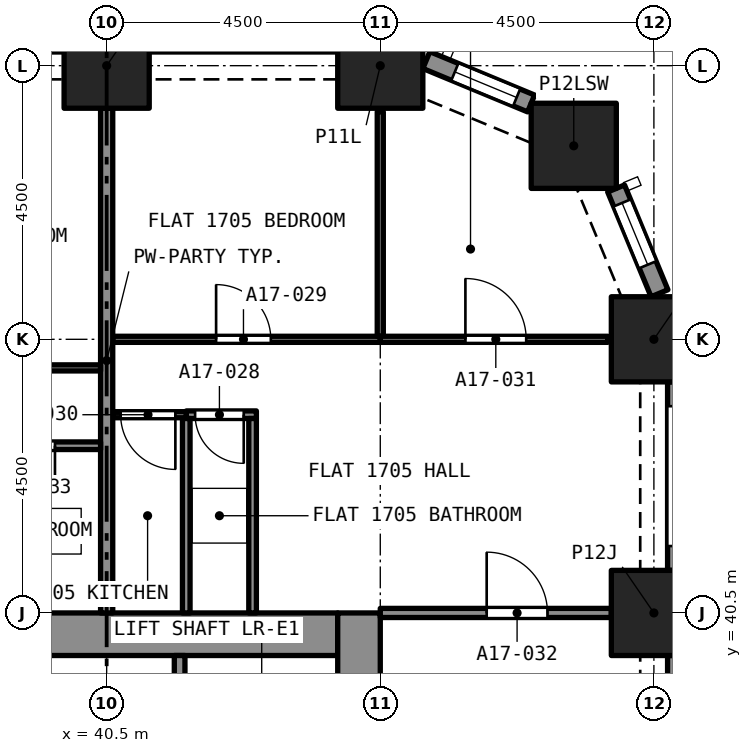
"""IFC4 building model, lengths in metres.
Left out: names, types, materials, properties, quantities, classifications, styles, units other than length and angle.
Written with IfcOpenShell. Run it as: python <this file> out.ifc"""

import sys

from ifc_helpers import new_model, si_unit, direction, frame, frame_2d, origin, origin_2d, place, context, subcontext, project, spatial, rectangle, extrude, element, fill, save


model = new_model("IFC4")
c1 = context("Model", 3, precision=1e-05, world=origin(), true_north=direction((0.0, 1.0)))
c2 = subcontext(c1, "Body", "Model", "MODEL_VIEW")
j1 = project(units=[si_unit("LENGTHUNIT", "METRE"), si_unit("PLANEANGLEUNIT", "RADIAN")], contexts=[c1])
p1 = place(None, origin())
s1 = spatial("IfcSite", under=j1, at=p1, CompositionType="ELEMENT")
p2 = place(p1, origin())
s2 = spatial("IfcBuilding", under=s1, at=p2, CompositionType="ELEMENT")
p3 = place(p2, frame((0.0, 0.0, 65.6)))
s3 = spatial("IfcBuildingStorey", under=s2, at=p3, CompositionType="ELEMENT", Elevation=65.6)
for number, where, z_axis, x_axis in (
    (1, (49.5, 40.5, 0.0), (0.0, 0.0, 1.0), (1.0, 0.0, 0.0)),
    (2, (49.5, 45.0, 0.0), (0.0, 0.0, 1.0), (1.0, 0.0, 0.0)),
    (3, (48.182, 48.182, 0.0), (0.0, 0.0, 1.0), (1.0, 0.0, 0.0)),
    (4, (40.5, 49.5, 0.0), (0.0, 0.0, 1.0), (1.0, 0.0, 0.0)),
    (5, (45.0, 49.5, 0.0), (0.0, 0.0, 1.0), (1.0, 0.0, 0.0)),
):
    element("IfcColumn", number, at=place(p3, frame(where, z_axis=z_axis, x_axis=x_axis)), inside=s3, PredefinedType="COLUMN", context=c2, shape_type="SweptSolid", body=[
        extrude(rectangle(XDim=1.4, YDim=1.4, at=origin_2d()), origin(), (0.0, 0.0, 1.0), 3.2),
    ])
p4 = place(p3, frame((36.7, 40.15, 0.0), z_axis=(0.0, 0.0, 1.0), x_axis=(1.0, 0.0, 0.0)))
e6 = element("IfcWall", 6, at=p4, inside=s3, PredefinedType="SOLIDWALL", context=c2, shape_type="SweptSolid", body=[
    extrude(rectangle(XDim=7.6, YDim=0.7, at=frame_2d((3.8, 0.0))), origin(), (0.0, 0.0, 1.0), 3.2),
])
p5 = place(p3, frame((44.65, 27.0, 0.0), z_axis=(0.0, 0.0, 1.0), x_axis=(0.0, 1.0, 0.0)))
e7 = element("IfcWall", 7, at=p5, inside=s3, PredefinedType="SOLIDWALL", context=c2, shape_type="SweptSolid", body=[
    extrude(rectangle(XDim=13.5, YDim=0.7, at=frame_2d((6.75, 0.0))), origin(), (0.0, 0.0, 1.0), 3.2),
])
p6 = place(p5, frame((8.95, 0.0, 0.0)))
e8 = element("IfcOpeningElement", 8, at=p6, cuts=e7, PredefinedType="OPENING", context=c2, shape_type="SweptSolid", body=[
    extrude(rectangle(XDim=1.2, YDim=2.1, at=frame_2d((0.6, 1.05))), frame((0.0, 0.36, 0.0), z_axis=(0.0, -1.0, 0.0), x_axis=(1.0, 0.0, 0.0)), (0.0, 0.0, 1.0), 0.72),
])
p7 = place(p3, frame((49.875, 39.8, 0.0), z_axis=(0.0, 0.0, 1.0), x_axis=(0.0, -1.0, 0.0)))
e9 = element("IfcWall", 9, at=p7, inside=s3, PredefinedType="SOLIDWALL", context=c2, shape_type="SweptSolid", body=[
    extrude(rectangle(XDim=3.1, YDim=0.3, at=frame_2d((1.55, 0.0))), origin(), (0.0, 0.0, 1.0), 3.2),
])
p8 = place(p7, frame((0.4, 0.0, 0.45)))
e10 = element("IfcOpeningElement", 10, at=p8, cuts=e9, PredefinedType="OPENING", context=c2, shape_type="SweptSolid", body=[
    extrude(rectangle(XDim=2.3, YDim=1.95, at=frame_2d((1.15, 0.975))), frame((0.0, 0.16, 0.0), z_axis=(0.0, -1.0, 0.0), x_axis=(1.0, 0.0, 0.0)), (0.0, 0.0, 1.0), 0.32),
])
p9 = place(p3, frame((49.875, 44.3, 0.0), z_axis=(0.0, 0.0, 1.0), x_axis=(0.0, -1.0, 0.0)))
e11 = element("IfcWall", 11, at=p9, inside=s3, PredefinedType="SOLIDWALL", context=c2, shape_type="SweptSolid", body=[
    extrude(rectangle(XDim=3.1, YDim=0.3, at=frame_2d((1.55, 0.0))), origin(), (0.0, 0.0, 1.0), 3.2),
])
p10 = place(p9, frame((0.4, 0.0, 0.45)))
e12 = element("IfcOpeningElement", 12, at=p10, cuts=e11, PredefinedType="OPENING", context=c2, shape_type="SweptSolid", body=[
    extrude(rectangle(XDim=2.3, YDim=1.95, at=frame_2d((1.15, 0.975))), frame((0.0, 0.16, 0.0), z_axis=(0.0, -1.0, 0.0), x_axis=(1.0, 0.0, 0.0)), (0.0, 0.0, 1.0), 0.32),
])
p11 = place(p3, frame((48.878, 47.48, 0.0), z_axis=(0.0, 0.0, 1.0), x_axis=(0.38262540684, -0.923903565336, 0.0)))
e13 = element("IfcWall", 13, at=p11, inside=s3, PredefinedType="SOLIDWALL", context=c2, shape_type="SweptSolid", body=[
    extrude(rectangle(XDim=1.865, YDim=0.3, at=frame_2d((0.933, 0.0))), origin(), (0.0, 0.0, 1.0), 3.2),
])
p12 = place(p11, frame((0.258, 0.0, 0.45)))
e14 = element("IfcOpeningElement", 14, at=p12, cuts=e13, PredefinedType="OPENING", context=c2, shape_type="SweptSolid", body=[
    extrude(rectangle(XDim=1.1, YDim=1.95, at=frame_2d((0.55, 0.975))), frame((0.0, 0.16, 0.0), z_axis=(0.0, -1.0, 0.0), x_axis=(1.0, 0.0, 0.0)), (0.0, 0.0, 1.0), 0.32),
])
p13 = place(p3, frame((45.757, 49.592, 0.0), z_axis=(0.0, 0.0, 1.0), x_axis=(0.923857286003, -0.382737135771, 0.0)))
e15 = element("IfcWall", 15, at=p13, inside=s3, PredefinedType="SOLIDWALL", context=c2, shape_type="SweptSolid", body=[
    extrude(rectangle(XDim=1.865, YDim=0.3, at=frame_2d((0.933, 0.0))), origin(), (0.0, 0.0, 1.0), 3.2),
])
p14 = place(p13, frame((0.508, 0.0, 0.45)))
e16 = element("IfcOpeningElement", 16, at=p14, cuts=e15, PredefinedType="OPENING", context=c2, shape_type="SweptSolid", body=[
    extrude(rectangle(XDim=1.1, YDim=1.95, at=frame_2d((0.55, 0.975))), frame((0.0, 0.16, 0.0), z_axis=(0.0, -1.0, 0.0), x_axis=(1.0, 0.0, 0.0)), (0.0, 0.0, 1.0), 0.32),
])
p15 = place(p3, frame((42.962, 43.76, 0.0), z_axis=(0.0, 0.0, 1.0), x_axis=(-1.0, 0.0, 0.0)))
e17 = element("IfcWall", 17, at=p15, inside=s3, PredefinedType="PARTITIONING", context=c2, shape_type="SweptSolid", body=[
    extrude(rectangle(XDim=1.153, YDim=0.125, at=frame_2d((0.577, 0.0))), origin(), (0.0, 0.0, 1.0), 2.9),
])
p16 = place(p15, frame((0.208, 0.0, 0.0)))
e18 = element("IfcOpeningElement", 18, at=p16, cuts=e17, PredefinedType="OPENING", context=c2, shape_type="SweptSolid", body=[
    extrude(rectangle(XDim=0.8, YDim=2.1, at=frame_2d((0.4, 1.05))), frame((0.0, 0.073, 0.0), z_axis=(0.0, -1.0, 0.0), x_axis=(1.0, 0.0, 0.0)), (0.0, 0.0, 1.0), 0.145),
])
for number, where, z_axis, x_axis in (
    (19, (42.9, 40.5, 0.0), (0.0, 0.0, 1.0), (0.0, 1.0, 0.0)),
    (20, (41.809, 40.5, 0.0), (0.0, 0.0, 1.0), (0.0, 1.0, 0.0)),
):
    element("IfcWall", number, at=place(p3, frame(where, z_axis=z_axis, x_axis=x_axis)), inside=s3, PredefinedType="PARTITIONING", context=c2, shape_type="SweptSolid", body=[
        extrude(rectangle(XDim=3.198, YDim=0.125, at=frame_2d((1.599, 0.0))), origin(), (0.0, 0.0, 1.0), 2.9),
    ])
p17 = place(p3, frame((40.6, 45.0, 0.0), z_axis=(0.0, 0.0, 1.0), x_axis=(1.0, 0.0, 0.0)))
e21 = element("IfcWall", 21, at=p17, inside=s3, PredefinedType="PARTITIONING", context=c2, shape_type="SweptSolid", body=[
    extrude(rectangle(XDim=4.4, YDim=0.1, at=frame_2d((2.2, 0.0))), origin(), (0.0, 0.0, 1.0), 2.9),
])
p18 = place(p17, frame((1.7, 0.0, 0.0)))
e22 = element("IfcOpeningElement", 22, at=p18, cuts=e21, PredefinedType="OPENING", context=c2, shape_type="SweptSolid", body=[
    extrude(rectangle(XDim=0.9, YDim=2.1, at=frame_2d((0.45, 1.05))), frame((0.0, 0.06, 0.0), z_axis=(0.0, -1.0, 0.0), x_axis=(1.0, 0.0, 0.0)), (0.0, 0.0, 1.0), 0.12),
])
p19 = place(p3, frame((45.0, 45.05, 0.0), z_axis=(0.0, 0.0, 1.0), x_axis=(0.0, 1.0, 0.0)))
e23 = element("IfcWall", 23, at=p19, inside=s3, PredefinedType="PARTITIONING", context=c2, shape_type="SweptSolid", body=[
    extrude(rectangle(XDim=3.692, YDim=0.1, at=frame_2d((1.846, 0.0))), origin(), (0.0, 0.0, 1.0), 2.9),
])
p20 = place(p3, frame((41.809, 43.76, 0.0), z_axis=(0.0, 0.0, 1.0), x_axis=(-1.0, 0.0, 0.0)))
e24 = element("IfcWall", 24, at=p20, inside=s3, PredefinedType="PARTITIONING", context=c2, shape_type="SweptSolid", body=[
    extrude(rectangle(XDim=1.209, YDim=0.1, at=frame_2d((0.604, 0.0))), origin(), (0.0, 0.0, 1.0), 2.9),
])
p21 = place(p20, frame((0.179, 0.0, 0.0)))
e25 = element("IfcOpeningElement", 25, at=p21, cuts=e24, PredefinedType="OPENING", context=c2, shape_type="SweptSolid", body=[
    extrude(rectangle(XDim=0.9, YDim=2.1, at=frame_2d((0.45, 1.05))), frame((0.0, 0.06, 0.0), z_axis=(0.0, -1.0, 0.0), x_axis=(1.0, 0.0, 0.0)), (0.0, 0.0, 1.0), 0.12),
])
p22 = place(p3, frame((45.0, 45.0, 0.0), z_axis=(0.0, 0.0, 1.0), x_axis=(1.0, 0.0, 0.0)))
e26 = element("IfcWall", 26, at=p22, inside=s3, PredefinedType="PARTITIONING", context=c2, shape_type="SweptSolid", body=[
    extrude(rectangle(XDim=3.742, YDim=0.1, at=frame_2d((1.871, 0.0))), origin(), (0.0, 0.0, 1.0), 2.9),
])
p23 = place(p22, frame((1.4, 0.0, 0.0)))
e27 = element("IfcOpeningElement", 27, at=p23, cuts=e26, PredefinedType="OPENING", context=c2, shape_type="SweptSolid", body=[
    extrude(rectangle(XDim=1.0, YDim=2.1, at=frame_2d((0.5, 1.05))), frame((0.0, 0.06, 0.0), z_axis=(0.0, -1.0, 0.0), x_axis=(1.0, 0.0, 0.0)), (0.0, 0.0, 1.0), 0.12),
])
p24 = place(p3, frame((45.0, 40.5, 0.0), z_axis=(0.0, 0.0, 1.0), x_axis=(1.0, 0.0, 0.0)))
e28 = element("IfcWall", 28, at=p24, inside=s3, PredefinedType="PARTITIONING", context=c2, shape_type="SweptSolid", body=[
    extrude(rectangle(XDim=3.8, YDim=0.15, at=frame_2d((1.9, 0.0))), origin(), (0.0, 0.0, 1.0), 2.9),
])
p25 = place(p24, frame((1.75, 0.0, 0.0)))
e29 = element("IfcOpeningElement", 29, at=p25, cuts=e28, PredefinedType="OPENING", context=c2, shape_type="SweptSolid", body=[
    extrude(rectangle(XDim=1.0, YDim=2.1, at=frame_2d((0.5, 1.05))), frame((0.0, 0.085, 0.0), z_axis=(0.0, -1.0, 0.0), x_axis=(1.0, 0.0, 0.0)), (0.0, 0.0, 1.0), 0.17),
])
p26 = place(p3, frame((40.5, 40.5, 0.0), z_axis=(0.0, 0.0, 1.0), x_axis=(0.0, 1.0, 0.0)))
e30 = element("IfcWall", 30, at=p26, inside=s3, PredefinedType="PARTITIONING", context=c2, shape_type="SweptSolid", body=[
    extrude(rectangle(XDim=8.3, YDim=0.2, at=frame_2d((4.15, 0.0))), origin(), (0.0, 0.0, 1.0), 2.9),
])
p27 = place(p3, frame((40.4, 43.25, 0.0), z_axis=(0.0, 0.0, 1.0), x_axis=(-1.0, 0.0, 0.0)))
e31 = element("IfcWall", 31, at=p27, inside=s3, PredefinedType="PARTITIONING", context=c2, shape_type="SweptSolid", body=[
    extrude(rectangle(XDim=2.4, YDim=0.125, at=frame_2d((1.2, 0.0))), origin(), (0.0, 0.0, 1.0), 2.9),
])
p28 = place(p27, frame((0.75, 0.0, 0.0)))
e32 = element("IfcOpeningElement", 32, at=p28, cuts=e31, PredefinedType="OPENING", context=c2, shape_type="SweptSolid", body=[
    extrude(rectangle(XDim=0.8, YDim=2.1, at=frame_2d((0.4, 1.05))), frame((0.0, 0.073, 0.0), z_axis=(0.0, -1.0, 0.0), x_axis=(1.0, 0.0, 0.0)), (0.0, 0.0, 1.0), 0.145),
])
p29 = place(p3, frame((36.0, 44.53, 0.0), z_axis=(0.0, 0.0, 1.0), x_axis=(1.0, 0.0, 0.0)))
e33 = element("IfcWall", 33, at=p29, inside=s3, PredefinedType="PARTITIONING", context=c2, shape_type="SweptSolid", body=[
    extrude(rectangle(XDim=4.4, YDim=0.1, at=frame_2d((2.2, 0.0))), origin(), (0.0, 0.0, 1.0), 2.9),
])
p30 = place(p29, frame((1.8, 0.0, 0.0)))
e34 = element("IfcOpeningElement", 34, at=p30, cuts=e33, PredefinedType="OPENING", context=c2, shape_type="SweptSolid", body=[
    extrude(rectangle(XDim=0.9, YDim=2.1, at=frame_2d((0.45, 1.05))), frame((0.0, 0.06, 0.0), z_axis=(0.0, -1.0, 0.0), x_axis=(1.0, 0.0, 0.0)), (0.0, 0.0, 1.0), 0.12),
])
p31 = place(p3, frame((41.7, 37.5, 0.0), z_axis=(0.0, 0.0, 1.0), x_axis=(0.0, 1.0, 0.0)))
e35 = element("IfcWall", 35, at=p31, inside=s3, PredefinedType="SOLIDWALL", context=c2, shape_type="SweptSolid", body=[
    extrude(rectangle(XDim=2.3, YDim=0.175, at=frame_2d((1.15, 0.0))), origin(), (0.0, 0.0, 1.0), 2.9),
])
p32 = place(p12, origin())
e36 = element("IfcWindow", 36, at=p32, inside=s3, PartitioningType="SINGLE_PANEL", PredefinedType="WINDOW", context=c2, shape_type="SweptSolid", body=[
    extrude(rectangle(XDim=1.1, YDim=1.95, at=frame_2d((0.55, 0.975))), frame((0.0, 0.03, 0.0), z_axis=(0.0, -1.0, 0.0), x_axis=(1.0, 0.0, 0.0)), (0.0, 0.0, 1.0), 0.06),
])
fill(e14, e36)
p33 = place(p14, origin())
e37 = element("IfcWindow", 37, at=p33, inside=s3, PartitioningType="SINGLE_PANEL", PredefinedType="WINDOW", context=c2, shape_type="SweptSolid", body=[
    extrude(rectangle(XDim=1.1, YDim=1.95, at=frame_2d((0.55, 0.975))), frame((0.0, 0.03, 0.0), z_axis=(0.0, -1.0, 0.0), x_axis=(1.0, 0.0, 0.0)), (0.0, 0.0, 1.0), 0.06),
])
fill(e16, e37)
p34 = place(p16, origin())
e38 = element("IfcDoor", 38, at=p34, inside=s3, OperationType="SINGLE_SWING_RIGHT", PredefinedType="DOOR", context=c2, shape_type="SweptSolid", body=[
    extrude(rectangle(XDim=0.8, YDim=2.1, at=frame_2d((0.4, 1.05))), frame((0.0, 0.025, 0.0), z_axis=(0.0, -1.0, 0.0), x_axis=(1.0, 0.0, 0.0)), (0.0, 0.0, 1.0), 0.05),
])
fill(e18, e38)
p35 = place(p18, origin())
e39 = element("IfcDoor", 39, at=p35, inside=s3, OperationType="SINGLE_SWING_LEFT", PredefinedType="DOOR", context=c2, shape_type="SweptSolid", body=[
    extrude(rectangle(XDim=0.9, YDim=2.1, at=frame_2d((0.45, 1.05))), frame((0.0, 0.025, 0.0), z_axis=(0.0, -1.0, 0.0), x_axis=(1.0, 0.0, 0.0)), (0.0, 0.0, 1.0), 0.05),
])
fill(e22, e39)
p36 = place(p21, origin())
e40 = element("IfcDoor", 40, at=p36, inside=s3, OperationType="SINGLE_SWING_RIGHT", PredefinedType="DOOR", context=c2, shape_type="SweptSolid", body=[
    extrude(rectangle(XDim=0.9, YDim=2.1, at=frame_2d((0.45, 1.05))), frame((0.0, 0.025, 0.0), z_axis=(0.0, -1.0, 0.0), x_axis=(1.0, 0.0, 0.0)), (0.0, 0.0, 1.0), 0.05),
])
fill(e25, e40)
p37 = place(p23, origin())
e41 = element("IfcDoor", 41, at=p37, inside=s3, OperationType="SINGLE_SWING_RIGHT", PredefinedType="DOOR", context=c2, shape_type="SweptSolid", body=[
    extrude(rectangle(XDim=1.0, YDim=2.1, at=frame_2d((0.5, 1.05))), frame((0.0, 0.025, 0.0), z_axis=(0.0, -1.0, 0.0), x_axis=(1.0, 0.0, 0.0)), (0.0, 0.0, 1.0), 0.05),
])
fill(e27, e41)
p38 = place(p25, origin())
e42 = element("IfcDoor", 42, at=p38, inside=s3, OperationType="SINGLE_SWING_RIGHT", PredefinedType="DOOR", context=c2, shape_type="SweptSolid", body=[
    extrude(rectangle(XDim=1.0, YDim=2.1, at=frame_2d((0.5, 1.05))), frame((0.0, 0.025, 0.0), z_axis=(0.0, -1.0, 0.0), x_axis=(1.0, 0.0, 0.0)), (0.0, 0.0, 1.0), 0.05),
])
fill(e29, e42)
p39 = place(p28, origin())
e43 = element("IfcDoor", 43, at=p39, inside=s3, OperationType="SINGLE_SWING_LEFT", PredefinedType="DOOR", context=c2, shape_type="SweptSolid", body=[
    extrude(rectangle(XDim=0.8, YDim=2.1, at=frame_2d((0.4, 1.05))), frame((0.0, 0.025, 0.0), z_axis=(0.0, -1.0, 0.0), x_axis=(1.0, 0.0, 0.0)), (0.0, 0.0, 1.0), 0.05),
])
fill(e32, e43)
save(model, sys.argv[1])
